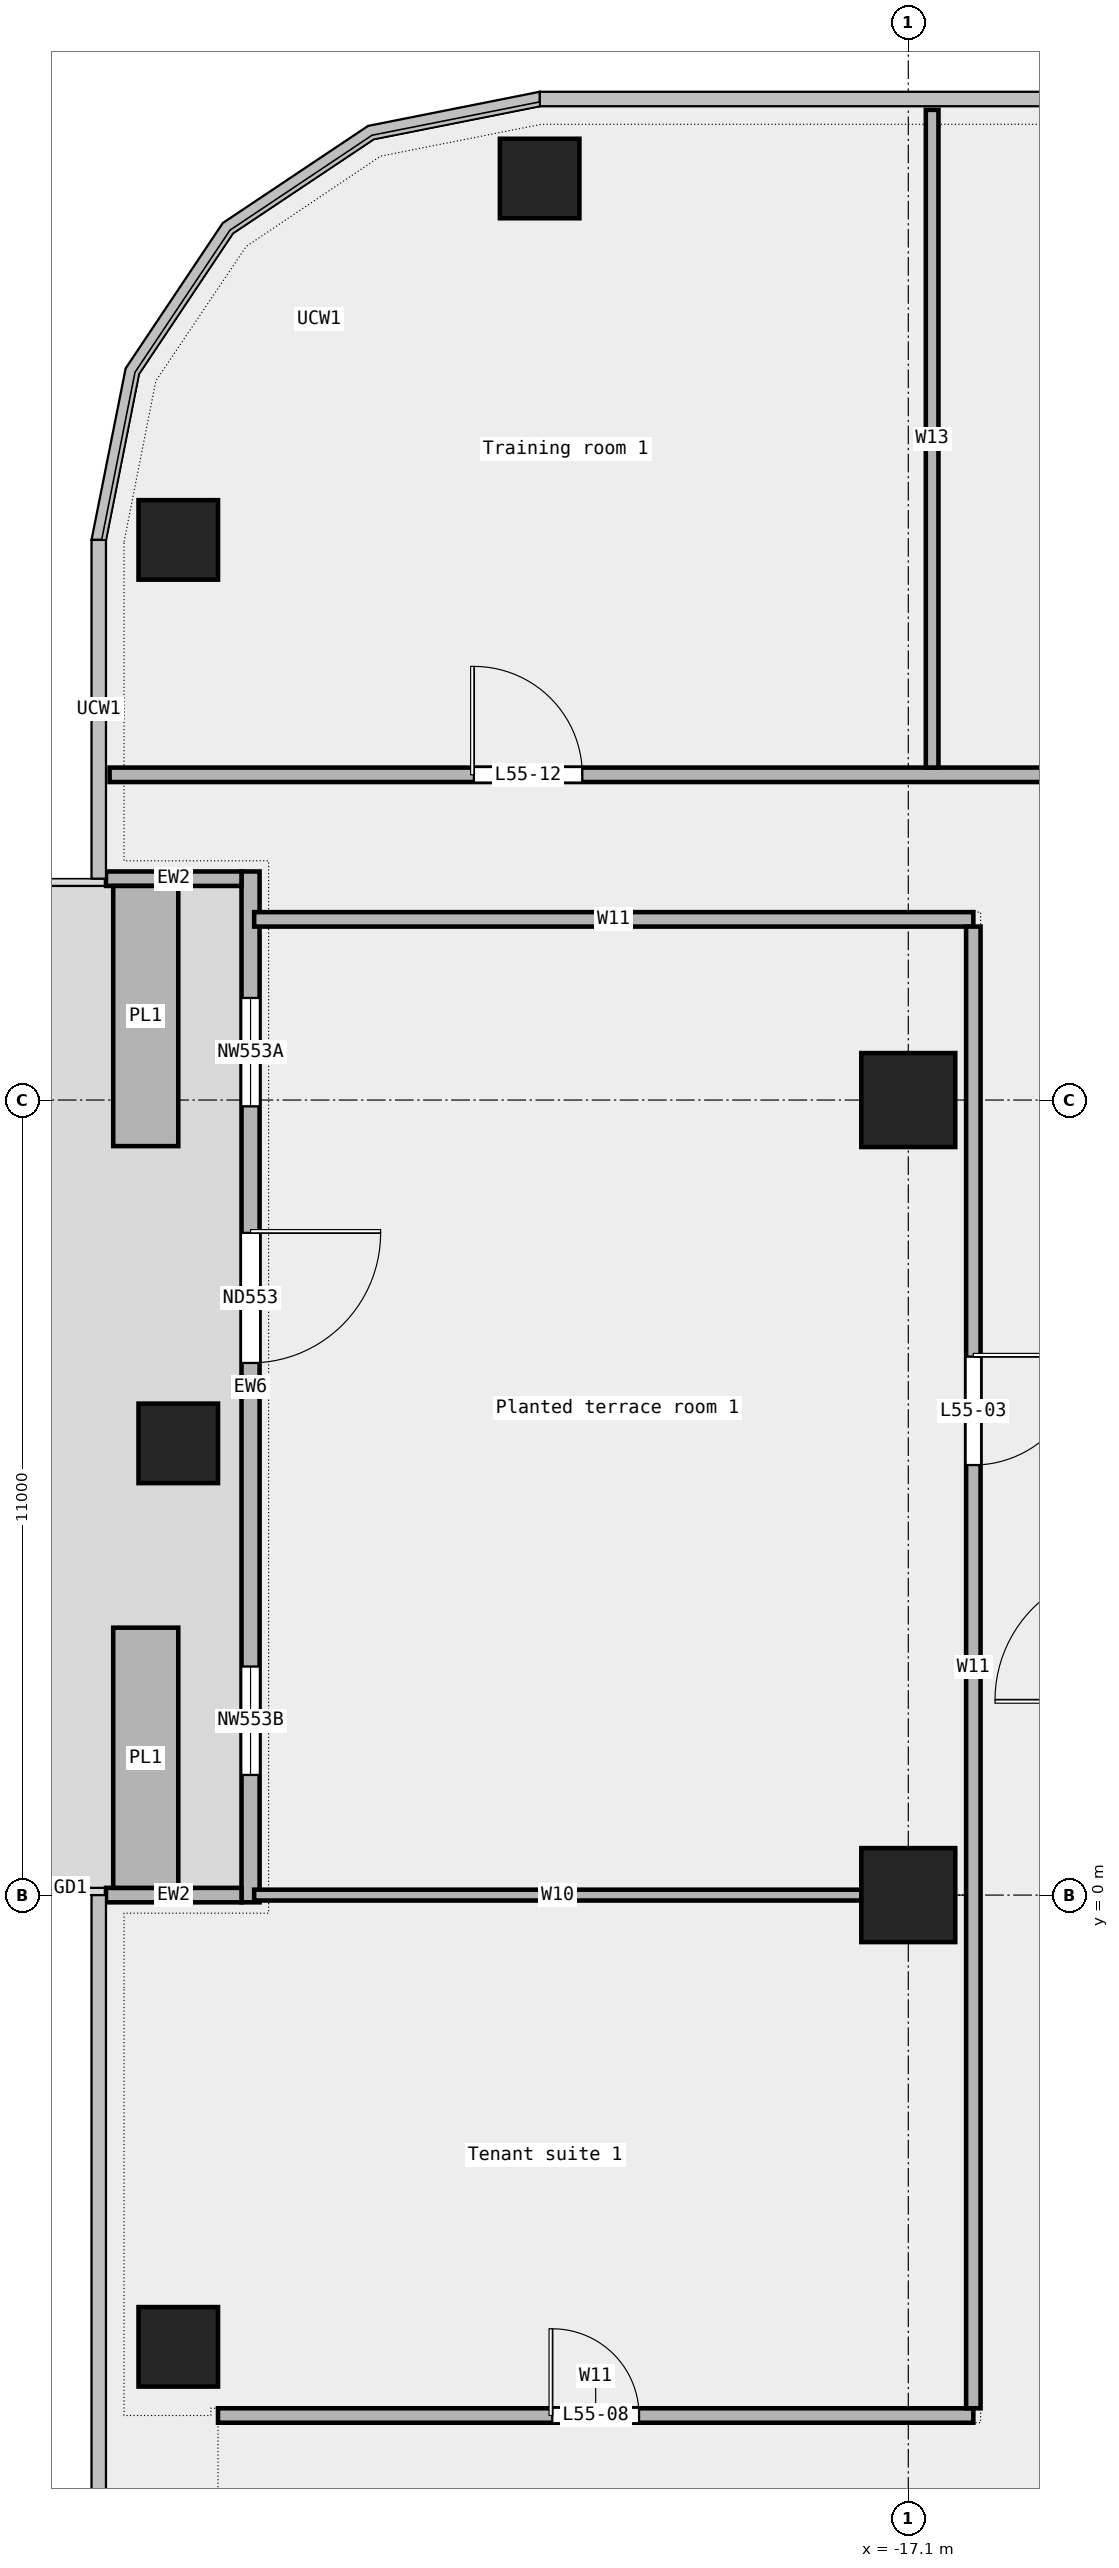
"""IFC4 building model, lengths in metres.
Left out: names, types, materials, properties, quantities, classifications, styles, units other than length and angle.
Written with IfcOpenShell. Run it as: python <this file> out.ifc"""

import sys

from ifc_helpers import new_model, si_unit, direction, frame, frame_2d, origin, origin_2d, place, context, subcontext, project, spatial, rectangle, extrude, element, fill, save


model = new_model("IFC4")
c1 = context("Model", 3, precision=1e-05, world=origin(), true_north=direction((0.0, 1.0)))
c2 = subcontext(c1, "Body", "Model", "MODEL_VIEW")
j1 = project(units=[si_unit("LENGTHUNIT", "METRE"), si_unit("PLANEANGLEUNIT", "RADIAN")], contexts=[c1])
p1 = place(None, origin())
s1 = spatial("IfcSite", under=j1, at=p1, CompositionType="ELEMENT")
p2 = place(p1, origin())
s2 = spatial("IfcBuilding", under=s1, at=p2, CompositionType="ELEMENT")
p3 = place(p2, frame((0.0, 0.0, 255.0)))
s3 = spatial("IfcBuildingStorey", under=s2, at=p3, CompositionType="ELEMENT", Elevation=255.0)
for number, where, z_axis, x_axis in (
    (1, (-22.2, 23.75, 0.0), (0.0, 0.0, 1.0), (1.0, 0.0, 0.0)),
    (2, (-27.2, 18.75, 0.0), (0.0, 0.0, 1.0), (1.0, 0.0, 0.0)),
    (3, (-27.2, 6.25, 0.0), (0.0, 0.0, 1.0), (1.0, 0.0, 0.0)),
    (4, (-27.2, -6.25, 0.0), (0.0, 0.0, 1.0), (1.0, 0.0, 0.0)),
):
    element("IfcColumn", number, at=place(p3, frame(where, z_axis=z_axis, x_axis=x_axis)), inside=s3, PredefinedType="COLUMN", context=c2, shape_type="SweptSolid", body=[
        extrude(rectangle(XDim=1.1, YDim=1.1, at=origin_2d()), origin(), (0.0, 0.0, 1.0), 3.4),
    ])
for number, where, z_axis, x_axis in (
    (5, (-17.1, 0.0, 0.0), (0.0, 0.0, 1.0), (1.0, 0.0, 0.0)),
    (6, (-17.1, 11.0, 0.0), (0.0, 0.0, 1.0), (1.0, 0.0, 0.0)),
):
    element("IfcColumn", number, at=place(p3, frame(where, z_axis=z_axis, x_axis=x_axis)), inside=s3, PredefinedType="COLUMN", context=c2, shape_type="SweptSolid", body=[
        extrude(rectangle(XDim=1.3, YDim=1.3, at=origin_2d()), origin(), (0.0, 0.0, 1.0), 3.4),
    ])
p4 = place(p3, frame((-26.2, 14.163, 0.0), z_axis=(0.0, 0.0, 1.0), x_axis=(0.0, -1.0, 0.0)))
e7 = element("IfcWall", 7, at=p4, inside=s3, PredefinedType="STANDARD", context=c2, shape_type="SweptSolid", body=[
    extrude(rectangle(XDim=14.263, YDim=0.25, at=frame_2d((7.131, 0.0))), origin(), (0.0, 0.0, 1.0), 3.4),
])
p5 = place(p4, frame((1.75, 0.0, 0.45)))
e8 = element("IfcOpeningElement", 8, at=p5, cuts=e7, PredefinedType="OPENING", context=c2, shape_type="SweptSolid", body=[
    extrude(rectangle(XDim=1.5, YDim=2.4, at=frame_2d((0.75, 1.2))), frame((0.0, 0.137, 0.0), z_axis=(0.0, -1.0, 0.0), x_axis=(1.0, 0.0, 0.0)), (0.0, 0.0, 1.0), 0.274),
])
p6 = place(p4, frame((5.0, 0.0, 0.0)))
e9 = element("IfcOpeningElement", 9, at=p6, cuts=e7, PredefinedType="OPENING", context=c2, shape_type="SweptSolid", body=[
    extrude(rectangle(XDim=1.8, YDim=2.4, at=frame_2d((0.9, 1.2))), frame((0.0, 0.137, 0.0), z_axis=(0.0, -1.0, 0.0), x_axis=(1.0, 0.0, 0.0)), (0.0, 0.0, 1.0), 0.274),
])
p7 = place(p4, frame((11.0, 0.0, 0.45)))
e10 = element("IfcOpeningElement", 10, at=p7, cuts=e7, PredefinedType="OPENING", context=c2, shape_type="SweptSolid", body=[
    extrude(rectangle(XDim=1.5, YDim=2.4, at=frame_2d((0.75, 1.2))), frame((0.0, 0.137, 0.0), z_axis=(0.0, -1.0, 0.0), x_axis=(1.0, 0.0, 0.0)), (0.0, 0.0, 1.0), 0.274),
])
for number, where, z_axis, x_axis in (
    (11, (-28.2, 14.062, 0.0), (0.0, 0.0, 1.0), (1.0, 0.0, 0.0)),
    (12, (-28.2, 0.0, 0.0), (0.0, 0.0, 1.0), (1.0, 0.0, 0.0)),
):
    element("IfcWall", number, at=place(p3, frame(where, z_axis=z_axis, x_axis=x_axis)), inside=s3, PredefinedType="STANDARD", context=c2, shape_type="SweptSolid", body=[
        extrude(rectangle(XDim=1.875, YDim=0.2, at=frame_2d((0.938, 0.0))), origin(), (0.0, 0.0, 1.0), 3.4),
    ])
for number, where, z_axis, x_axis in (
    (13, (-27.65, 13.962, 0.0), (0.0, 0.0, 1.0), (0.0, -1.0, 0.0)),
    (14, (-27.65, 3.7, 0.0), (0.0, 0.0, 1.0), (0.0, -1.0, 0.0)),
):
    element("IfcWall", number, at=place(p3, frame(where, z_axis=z_axis, x_axis=x_axis)), inside=s3, PredefinedType="STANDARD", context=c2, shape_type="SweptSolid", body=[
        extrude(rectangle(XDim=3.6, YDim=0.9, at=frame_2d((1.8, 0.0))), origin(), (0.0, 0.0, 1.0), 0.7),
    ])
p8 = place(p3, frame((-26.65, -7.2, 0.0), z_axis=(0.0, 0.0, 1.0), x_axis=(1.0, 0.0, 0.0)))
e15 = element("IfcWall", 15, at=p8, inside=s3, PredefinedType="PARTITIONING", context=c2, shape_type="SweptSolid", body=[
    extrude(rectangle(XDim=10.45, YDim=0.2, at=frame_2d((5.225, 0.0))), origin(), (0.0, 0.0, 1.0), 3.4),
])
p9 = place(p8, frame((4.625, 0.0, 0.0)))
e16 = element("IfcOpeningElement", 16, at=p9, cuts=e15, PredefinedType="OPENING", context=c2, shape_type="SweptSolid", body=[
    extrude(rectangle(XDim=1.2, YDim=2.1, at=frame_2d((0.6, 1.05))), frame((0.0, 0.112, 0.0), z_axis=(0.0, -1.0, 0.0), x_axis=(1.0, 0.0, 0.0)), (0.0, 0.0, 1.0), 0.224),
])
p10 = place(p3, frame((-26.15, 0.0, 0.0), z_axis=(0.0, 0.0, 1.0), x_axis=(1.0, 0.0, 0.0)))
e17 = element("IfcWall", 17, at=p10, inside=s3, PredefinedType="PARTITIONING", context=c2, shape_type="SweptSolid", body=[
    extrude(rectangle(XDim=8.4, YDim=0.15, at=frame_2d((4.2, 0.0))), origin(), (0.0, 0.0, 1.0), 3.4),
])
p11 = place(p3, frame((-26.15, 13.5, 0.0), z_axis=(0.0, 0.0, 1.0), x_axis=(1.0, 0.0, 0.0)))
e18 = element("IfcWall", 18, at=p11, inside=s3, PredefinedType="PARTITIONING", context=c2, shape_type="SweptSolid", body=[
    extrude(rectangle(XDim=9.95, YDim=0.2, at=frame_2d((4.975, 0.0))), origin(), (0.0, 0.0, 1.0), 3.4),
])
p12 = place(p3, frame((-28.15, 15.5, 0.0), z_axis=(0.0, 0.0, 1.0), x_axis=(1.0, 0.0, 0.0)))
e19 = element("IfcWall", 19, at=p12, inside=s3, PredefinedType="PARTITIONING", context=c2, shape_type="SweptSolid", body=[
    extrude(rectangle(XDim=56.3, YDim=0.2, at=frame_2d((28.15, 0.0))), origin(), (0.0, 0.0, 1.0), 3.4),
])
p13 = place(p12, frame((50.405, 0.0, 0.0)))
e20 = element("IfcOpeningElement", 20, at=p13, cuts=e19, PredefinedType="OPENING", context=c2, shape_type="SweptSolid", body=[
    extrude(rectangle(XDim=1.2, YDim=2.1, at=frame_2d((0.6, 1.05))), frame((0.0, 0.112, 0.0), z_axis=(0.0, -1.0, 0.0), x_axis=(1.0, 0.0, 0.0)), (0.0, 0.0, 1.0), 0.224),
])
p14 = place(p12, frame((38.5, 0.0, 0.0)))
e21 = element("IfcOpeningElement", 21, at=p14, cuts=e19, PredefinedType="OPENING", context=c2, shape_type="SweptSolid", body=[
    extrude(rectangle(XDim=1.5, YDim=2.1, at=frame_2d((0.75, 1.05))), frame((0.0, 0.112, 0.0), z_axis=(0.0, -1.0, 0.0), x_axis=(1.0, 0.0, 0.0)), (0.0, 0.0, 1.0), 0.224),
])
p15 = place(p12, frame((30.853, 0.0, 0.0)))
e22 = element("IfcOpeningElement", 22, at=p15, cuts=e19, PredefinedType="OPENING", context=c2, shape_type="SweptSolid", body=[
    extrude(rectangle(XDim=0.9, YDim=2.1, at=frame_2d((0.45, 1.05))), frame((0.0, 0.112, 0.0), z_axis=(0.0, -1.0, 0.0), x_axis=(1.0, 0.0, 0.0)), (0.0, 0.0, 1.0), 0.224),
])
p16 = place(p12, frame((19.798, 0.0, 0.0)))
e23 = element("IfcOpeningElement", 23, at=p16, cuts=e19, PredefinedType="OPENING", context=c2, shape_type="SweptSolid", body=[
    extrude(rectangle(XDim=1.8, YDim=2.1, at=frame_2d((0.9, 1.05))), frame((0.0, 0.112, 0.0), z_axis=(0.0, -1.0, 0.0), x_axis=(1.0, 0.0, 0.0)), (0.0, 0.0, 1.0), 0.224),
])
p17 = place(p12, frame((5.04, 0.0, 0.0)))
e24 = element("IfcOpeningElement", 24, at=p17, cuts=e19, PredefinedType="OPENING", context=c2, shape_type="SweptSolid", body=[
    extrude(rectangle(XDim=1.5, YDim=2.1, at=frame_2d((0.75, 1.05))), frame((0.0, 0.112, 0.0), z_axis=(0.0, -1.0, 0.0), x_axis=(1.0, 0.0, 0.0)), (0.0, 0.0, 1.0), 0.224),
])
p18 = place(p3, frame((-16.77, 15.6, 0.0), z_axis=(0.0, 0.0, 1.0), x_axis=(0.0, 1.0, 0.0)))
e25 = element("IfcWall", 25, at=p18, inside=s3, PredefinedType="PARTITIONING", context=c2, shape_type="SweptSolid", body=[
    extrude(rectangle(XDim=9.1, YDim=0.175, at=frame_2d((4.55, 0.0))), origin(), (0.0, 0.0, 1.0), 3.4),
])
p19 = place(p3, frame((-16.2, -7.1, 0.0), z_axis=(0.0, 0.0, 1.0), x_axis=(0.0, 1.0, 0.0)))
e26 = element("IfcWall", 26, at=p19, inside=s3, PredefinedType="PARTITIONING", context=c2, shape_type="SweptSolid", body=[
    extrude(rectangle(XDim=20.5, YDim=0.2, at=frame_2d((10.25, 0.0))), origin(), (0.0, 0.0, 1.0), 3.4),
])
p20 = place(p19, frame((13.05, 0.0, 0.0)))
e27 = element("IfcOpeningElement", 27, at=p20, cuts=e26, PredefinedType="OPENING", context=c2, shape_type="SweptSolid", body=[
    extrude(rectangle(XDim=1.5, YDim=2.1, at=frame_2d((0.75, 1.05))), frame((0.0, 0.112, 0.0), z_axis=(0.0, -1.0, 0.0), x_axis=(1.0, 0.0, 0.0)), (0.0, 0.0, 1.0), 0.224),
])
p21 = place(p5, origin())
e28 = element("IfcWindow", 28, at=p21, inside=s3, PartitioningType="SINGLE_PANEL", PredefinedType="WINDOW", context=c2, shape_type="SweptSolid", body=[
    extrude(rectangle(XDim=1.5, YDim=2.4, at=frame_2d((0.75, 1.2))), frame((0.0, 0.03, 0.0), z_axis=(0.0, -1.0, 0.0), x_axis=(1.0, 0.0, 0.0)), (0.0, 0.0, 1.0), 0.06),
])
fill(e8, e28)
p22 = place(p6, origin())
e29 = element("IfcDoor", 29, at=p22, inside=s3, OperationType="DOUBLE_DOOR_SINGLE_SWING", PredefinedType="DOOR", context=c2, shape_type="SweptSolid", body=[
    extrude(rectangle(XDim=1.8, YDim=2.4, at=frame_2d((0.9, 1.2))), frame((0.0, 0.025, 0.0), z_axis=(0.0, -1.0, 0.0), x_axis=(1.0, 0.0, 0.0)), (0.0, 0.0, 1.0), 0.05),
])
fill(e9, e29)
p23 = place(p7, origin())
e30 = element("IfcWindow", 30, at=p23, inside=s3, PartitioningType="SINGLE_PANEL", PredefinedType="WINDOW", context=c2, shape_type="SweptSolid", body=[
    extrude(rectangle(XDim=1.5, YDim=2.4, at=frame_2d((0.75, 1.2))), frame((0.0, 0.03, 0.0), z_axis=(0.0, -1.0, 0.0), x_axis=(1.0, 0.0, 0.0)), (0.0, 0.0, 1.0), 0.06),
])
fill(e10, e30)
p24 = place(p20, origin())
e31 = element("IfcDoor", 31, at=p24, inside=s3, OperationType="DOUBLE_DOOR_SINGLE_SWING", PredefinedType="DOOR", context=c2, shape_type="SweptSolid", body=[
    extrude(rectangle(XDim=1.5, YDim=2.1, at=frame_2d((0.75, 1.05))), frame((0.0, 0.025, 0.0), z_axis=(0.0, -1.0, 0.0), x_axis=(1.0, 0.0, 0.0)), (0.0, 0.0, 1.0), 0.05),
])
fill(e27, e31)
p25 = place(p9, origin())
e32 = element("IfcDoor", 32, at=p25, inside=s3, OperationType="SINGLE_SWING_LEFT", PredefinedType="DOOR", context=c2, shape_type="SweptSolid", body=[
    extrude(rectangle(XDim=1.2, YDim=2.1, at=frame_2d((0.6, 1.05))), frame((0.0, 0.025, 0.0), z_axis=(0.0, -1.0, 0.0), x_axis=(1.0, 0.0, 0.0)), (0.0, 0.0, 1.0), 0.05),
])
fill(e16, e32)
p26 = place(p17, origin())
e33 = element("IfcDoor", 33, at=p26, inside=s3, OperationType="DOUBLE_DOOR_SINGLE_SWING", PredefinedType="DOOR", context=c2, shape_type="SweptSolid", body=[
    extrude(rectangle(XDim=1.5, YDim=2.1, at=frame_2d((0.75, 1.05))), frame((0.0, 0.025, 0.0), z_axis=(0.0, -1.0, 0.0), x_axis=(1.0, 0.0, 0.0)), (0.0, 0.0, 1.0), 0.05),
])
fill(e24, e33)
save(model, sys.argv[1])
